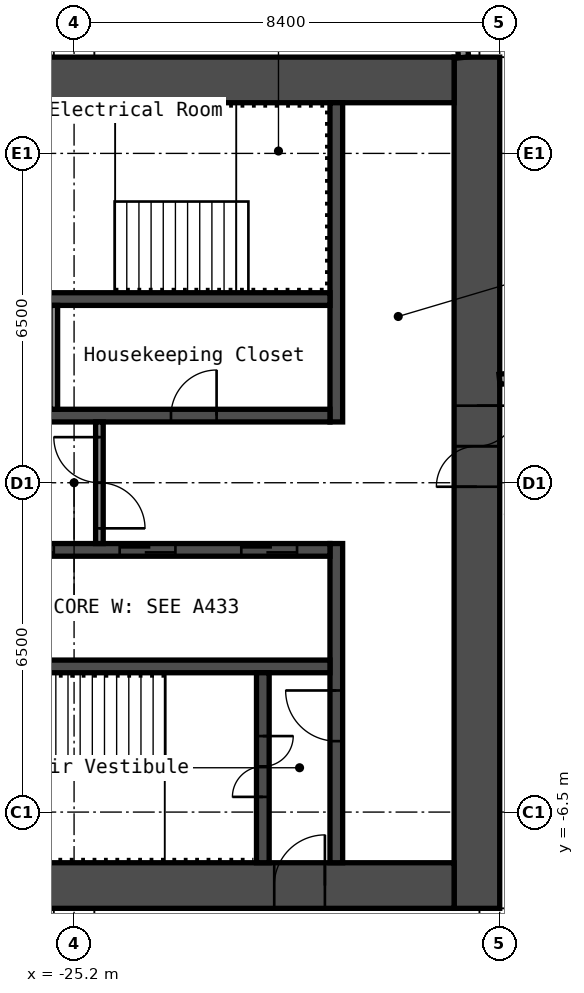
"""IFC4 building model, lengths in metres.
Left out: names, types, materials, properties, quantities, classifications, styles, units other than length and angle.
Written with IfcOpenShell. Run it as: python <this file> out.ifc"""

import sys

from ifc_helpers import new_model, si_unit, direction, frame, frame_2d, origin, place, context, subcontext, project, spatial, rectangle, extrude, element, fill, save


model = new_model("IFC4")
c1 = context("Model", 3, precision=1e-05, world=origin(), true_north=direction((0.0, 1.0)))
c2 = subcontext(c1, "Body", "Model", "MODEL_VIEW")
j1 = project(units=[si_unit("LENGTHUNIT", "METRE"), si_unit("PLANEANGLEUNIT", "RADIAN")], contexts=[c1])
p1 = place(None, origin())
s1 = spatial("IfcSite", under=j1, at=p1, CompositionType="ELEMENT")
p2 = place(p1, origin())
s2 = spatial("IfcBuilding", under=s1, at=p2, CompositionType="ELEMENT")
p3 = place(p2, frame((0.0, 0.0, 228.2)))
s3 = spatial("IfcBuildingStorey", under=s2, at=p3, CompositionType="ELEMENT", Elevation=228.2)
p4 = place(p3, frame((-17.25, -8.4, 0.0), z_axis=(0.0, 0.0, 1.0), x_axis=(0.0, 1.0, 0.0)))
e1 = element("IfcWall", 1, at=p4, inside=s3, PredefinedType="SHEAR", context=c2, shape_type="SweptSolid", body=[
    extrude(rectangle(XDim=16.8, YDim=0.9, at=frame_2d((8.4, 0.0))), origin(), (0.0, 0.0, 1.0), 4.1),
])
p5 = place(p4, frame((8.321, 0.0, 0.0)))
e2 = element("IfcOpeningElement", 2, at=p5, cuts=e1, PredefinedType="OPENING", context=c2, shape_type="SweptSolid", body=[
    extrude(rectangle(XDim=1.6, YDim=2.1, at=frame_2d((0.8, 1.05))), frame((0.0, 0.46, 0.0), z_axis=(0.0, -1.0, 0.0), x_axis=(1.0, 0.0, 0.0)), (0.0, 0.0, 1.0), 0.92),
])
p6 = place(p3, frame((-32.7, 7.95, 0.0), z_axis=(0.0, 0.0, 1.0), x_axis=(1.0, 0.0, 0.0)))
e3 = element("IfcWall", 3, at=p6, inside=s3, PredefinedType="SHEAR", context=c2, shape_type="SweptSolid", body=[
    extrude(rectangle(XDim=15.0, YDim=0.9, at=frame_2d((7.5, 0.0))), origin(), (0.0, 0.0, 1.0), 4.1),
])
p7 = place(p6, frame((3.4, 0.0, 0.0)))
e4 = element("IfcOpeningElement", 4, at=p7, cuts=e3, PredefinedType="OPENING", context=c2, shape_type="SweptSolid", body=[
    extrude(rectangle(XDim=1.2, YDim=2.1, at=frame_2d((0.6, 1.05))), frame((0.0, 0.46, 0.0), z_axis=(0.0, -1.0, 0.0), x_axis=(1.0, 0.0, 0.0)), (0.0, 0.0, 1.0), 0.92),
])
p8 = place(p6, frame((0.75, 0.0, 0.0)))
e5 = element("IfcOpeningElement", 5, at=p8, cuts=e3, PredefinedType="OPENING", context=c2, shape_type="SweptSolid", body=[
    extrude(rectangle(XDim=0.9, YDim=2.1, at=frame_2d((0.45, 1.05))), frame((0.0, 0.46, 0.0), z_axis=(0.0, -1.0, 0.0), x_axis=(1.0, 0.0, 0.0)), (0.0, 0.0, 1.0), 0.92),
])
p9 = place(p3, frame((-32.7, -7.95, 0.0), z_axis=(0.0, 0.0, 1.0), x_axis=(1.0, 0.0, 0.0)))
e6 = element("IfcWall", 6, at=p9, inside=s3, PredefinedType="SHEAR", context=c2, shape_type="SweptSolid", body=[
    extrude(rectangle(XDim=15.0, YDim=0.9, at=frame_2d((7.5, 0.0))), origin(), (0.0, 0.0, 1.0), 4.1),
])
p10 = place(p9, frame((11.45, 0.0, 0.0)))
e7 = element("IfcOpeningElement", 7, at=p10, cuts=e6, PredefinedType="OPENING", context=c2, shape_type="SweptSolid", body=[
    extrude(rectangle(XDim=1.0, YDim=2.1, at=frame_2d((0.5, 1.05))), frame((0.0, 0.46, 0.0), z_axis=(0.0, -1.0, 0.0), x_axis=(1.0, 0.0, 0.0)), (0.0, 0.0, 1.0), 0.92),
])
p11 = place(p3, frame((-20.025, 1.2, 0.0), z_axis=(0.0, 0.0, 1.0), x_axis=(0.0, 1.0, 0.0)))
e8 = element("IfcWall", 8, at=p11, inside=s3, PredefinedType="SHEAR", context=c2, shape_type="SweptSolid", body=[
    extrude(rectangle(XDim=6.3, YDim=0.25, at=frame_2d((3.15, 0.0))), origin(), (0.0, 0.0, 1.0), 4.1),
])
p12 = place(p3, frame((-20.025, -7.5, 0.0), z_axis=(0.0, 0.0, 1.0), x_axis=(0.0, 1.0, 0.0)))
e9 = element("IfcWall", 9, at=p12, inside=s3, PredefinedType="SHEAR", context=c2, shape_type="SweptSolid", body=[
    extrude(rectangle(XDim=6.3, YDim=0.25, at=frame_2d((3.15, 0.0))), origin(), (0.0, 0.0, 1.0), 4.1),
])
p13 = place(p12, frame((2.4, 0.0, 0.0)))
e10 = element("IfcOpeningElement", 10, at=p13, cuts=e9, PredefinedType="OPENING", context=c2, shape_type="SweptSolid", body=[
    extrude(rectangle(XDim=1.0, YDim=2.1, at=frame_2d((0.5, 1.05))), frame((0.0, 0.135, 0.0), z_axis=(0.0, -1.0, 0.0), x_axis=(1.0, 0.0, 0.0)), (0.0, 0.0, 1.0), 0.27),
])
p14 = place(p3, frame((-27.65, 1.325, 0.0), z_axis=(0.0, 0.0, 1.0), x_axis=(1.0, 0.0, 0.0)))
e11 = element("IfcWall", 11, at=p14, inside=s3, PredefinedType="SHEAR", context=c2, shape_type="SweptSolid", body=[
    extrude(rectangle(XDim=7.5, YDim=0.25, at=frame_2d((3.75, 0.0))), origin(), (0.0, 0.0, 1.0), 4.1),
])
p15 = place(p14, frame((4.363, 0.0, 0.0)))
e12 = element("IfcOpeningElement", 12, at=p15, cuts=e11, PredefinedType="OPENING", context=c2, shape_type="SweptSolid", body=[
    extrude(rectangle(XDim=0.9, YDim=2.1, at=frame_2d((0.45, 1.05))), frame((0.0, 0.135, 0.0), z_axis=(0.0, -1.0, 0.0), x_axis=(1.0, 0.0, 0.0)), (0.0, 0.0, 1.0), 0.27),
])
p16 = place(p14, frame((0.663, 0.0, 0.0)))
e13 = element("IfcOpeningElement", 13, at=p16, cuts=e11, PredefinedType="OPENING", context=c2, shape_type="SweptSolid", body=[
    extrude(rectangle(XDim=0.9, YDim=2.1, at=frame_2d((0.45, 1.05))), frame((0.0, 0.135, 0.0), z_axis=(0.0, -1.0, 0.0), x_axis=(1.0, 0.0, 0.0)), (0.0, 0.0, 1.0), 0.27),
])
p17 = place(p3, frame((-27.65, 3.625, 0.0), z_axis=(0.0, 0.0, 1.0), x_axis=(1.0, 0.0, 0.0)))
e14 = element("IfcWall", 14, at=p17, inside=s3, PredefinedType="SHEAR", context=c2, shape_type="SweptSolid", body=[
    extrude(rectangle(XDim=7.5, YDim=0.25, at=frame_2d((3.75, 0.0))), origin(), (0.0, 0.0, 1.0), 4.1),
])
p18 = place(p3, frame((-27.65, -1.325, 0.0), z_axis=(0.0, 0.0, 1.0), x_axis=(1.0, 0.0, 0.0)))
e15 = element("IfcWall", 15, at=p18, inside=s3, PredefinedType="SHEAR", context=c2, shape_type="SweptSolid", body=[
    extrude(rectangle(XDim=7.5, YDim=0.25, at=frame_2d((3.75, 0.0))), origin(), (0.0, 0.0, 1.0), 4.1),
])
p19 = place(p18, frame((5.75, 0.0, 0.0)))
e16 = element("IfcOpeningElement", 16, at=p19, cuts=e15, PredefinedType="OPENING", context=c2, shape_type="SweptSolid", body=[
    extrude(rectangle(XDim=1.1, YDim=2.1, at=frame_2d((0.55, 1.05))), frame((0.0, 0.135, 0.0), z_axis=(0.0, -1.0, 0.0), x_axis=(1.0, 0.0, 0.0)), (0.0, 0.0, 1.0), 0.27),
])
p20 = place(p18, frame((3.35, 0.0, 0.0)))
e17 = element("IfcOpeningElement", 17, at=p20, cuts=e15, PredefinedType="OPENING", context=c2, shape_type="SweptSolid", body=[
    extrude(rectangle(XDim=1.1, YDim=2.1, at=frame_2d((0.55, 1.05))), frame((0.0, 0.135, 0.0), z_axis=(0.0, -1.0, 0.0), x_axis=(1.0, 0.0, 0.0)), (0.0, 0.0, 1.0), 0.27),
])
p21 = place(p18, frame((0.95, 0.0, 0.0)))
e18 = element("IfcOpeningElement", 18, at=p21, cuts=e15, PredefinedType="OPENING", context=c2, shape_type="SweptSolid", body=[
    extrude(rectangle(XDim=1.1, YDim=2.1, at=frame_2d((0.55, 1.05))), frame((0.0, 0.135, 0.0), z_axis=(0.0, -1.0, 0.0), x_axis=(1.0, 0.0, 0.0)), (0.0, 0.0, 1.0), 0.27),
])
p22 = place(p3, frame((-27.65, -3.625, 0.0), z_axis=(0.0, 0.0, 1.0), x_axis=(1.0, 0.0, 0.0)))
e19 = element("IfcWall", 19, at=p22, inside=s3, PredefinedType="SHEAR", context=c2, shape_type="SweptSolid", body=[
    extrude(rectangle(XDim=7.5, YDim=0.25, at=frame_2d((3.75, 0.0))), origin(), (0.0, 0.0, 1.0), 4.1),
])
p23 = place(p3, frame((-21.475, -7.5, 0.0), z_axis=(0.0, 0.0, 1.0), x_axis=(0.0, 1.0, 0.0)))
e20 = element("IfcWall", 20, at=p23, inside=s3, PredefinedType="SHEAR", context=c2, shape_type="SweptSolid", body=[
    extrude(rectangle(XDim=3.75, YDim=0.25, at=frame_2d((1.875, 0.0))), origin(), (0.0, 0.0, 1.0), 4.1),
])
p24 = place(p23, frame((1.3, 0.0, 0.0)))
e21 = element("IfcOpeningElement", 21, at=p24, cuts=e20, PredefinedType="OPENING", context=c2, shape_type="SweptSolid", body=[
    extrude(rectangle(XDim=1.2, YDim=2.1, at=frame_2d((0.6, 1.05))), frame((0.0, 0.135, 0.0), z_axis=(0.0, -1.0, 0.0), x_axis=(1.0, 0.0, 0.0)), (0.0, 0.0, 1.0), 0.27),
])
p25 = place(p3, frame((-24.7, -1.2, 0.0), z_axis=(0.0, 0.0, 1.0), x_axis=(0.0, 1.0, 0.0)))
e22 = element("IfcWall", 22, at=p25, inside=s3, PredefinedType="PARTITIONING", context=c2, shape_type="SweptSolid", body=[
    extrude(rectangle(XDim=2.4, YDim=0.15, at=frame_2d((1.2, 0.0))), origin(), (0.0, 0.0, 1.0), 4.1),
])
p26 = place(p25, frame((0.3, 0.0, 0.0)))
e23 = element("IfcOpeningElement", 23, at=p26, cuts=e22, PredefinedType="OPENING", context=c2, shape_type="SweptSolid", body=[
    extrude(rectangle(XDim=1.8, YDim=2.1, at=frame_2d((0.9, 1.05))), frame((0.0, 0.085, 0.0), z_axis=(0.0, -1.0, 0.0), x_axis=(1.0, 0.0, 0.0)), (0.0, 0.0, 1.0), 0.17),
])
p27 = place(p3, frame((-25.6, 1.45, 0.0), z_axis=(0.0, 0.0, 1.0), x_axis=(0.0, 1.0, 0.0)))
e24 = element("IfcWall", 24, at=p27, inside=s3, PredefinedType="PARTITIONING", context=c2, shape_type="SweptSolid", body=[
    extrude(rectangle(XDim=2.05, YDim=0.15, at=frame_2d((1.025, 0.0))), origin(), (0.0, 0.0, 1.0), 4.1),
])
p28 = place(p3, frame((-16.805, 2.041, 0.0), z_axis=(0.0, 0.0, 1.0), x_axis=(0.994521146831, 0.104535584879, 0.0)))
e25 = element("IfcWall", 25, at=p28, inside=s3, PredefinedType="PARTITIONING", context=c2, shape_type="SweptSolid", body=[
    extrude(rectangle(XDim=33.561, YDim=0.2, at=frame_2d((16.78, 0.0))), origin(), (0.0, 0.0, 1.0), 4.1),
])
p29 = place(p28, frame((3.711, 0.0, 0.0)))
e26 = element("IfcOpeningElement", 26, at=p29, cuts=e25, PredefinedType="OPENING", context=c2, shape_type="SweptSolid", body=[
    extrude(rectangle(XDim=0.9, YDim=2.1, at=frame_2d((0.45, 1.05))), frame((0.0, 0.11, 0.0), z_axis=(0.0, -1.0, 0.0), x_axis=(1.0, 0.0, 0.0)), (0.0, 0.0, 1.0), 0.22),
])
p30 = place(p28, frame((12.111, 0.0, 0.0)))
e27 = element("IfcOpeningElement", 27, at=p30, cuts=e25, PredefinedType="OPENING", context=c2, shape_type="SweptSolid", body=[
    extrude(rectangle(XDim=0.9, YDim=2.1, at=frame_2d((0.45, 1.05))), frame((0.0, 0.11, 0.0), z_axis=(0.0, -1.0, 0.0), x_axis=(1.0, 0.0, 0.0)), (0.0, 0.0, 1.0), 0.22),
])
p31 = place(p28, frame((20.161, 0.0, 0.0)))
e28 = element("IfcOpeningElement", 28, at=p31, cuts=e25, PredefinedType="OPENING", context=c2, shape_type="SweptSolid", body=[
    extrude(rectangle(XDim=1.6, YDim=2.1, at=frame_2d((0.8, 1.05))), frame((0.0, 0.11, 0.0), z_axis=(0.0, -1.0, 0.0), x_axis=(1.0, 0.0, 0.0)), (0.0, 0.0, 1.0), 0.22),
])
p32 = place(p28, frame((28.561, 0.0, 0.0)))
e29 = element("IfcOpeningElement", 29, at=p32, cuts=e25, PredefinedType="OPENING", context=c2, shape_type="SweptSolid", body=[
    extrude(rectangle(XDim=1.6, YDim=2.1, at=frame_2d((0.8, 1.05))), frame((0.0, 0.11, 0.0), z_axis=(0.0, -1.0, 0.0), x_axis=(1.0, 0.0, 0.0)), (0.0, 0.0, 1.0), 0.22),
])
p33 = place(p3, frame((-17.512, 8.395, 0.0), z_axis=(0.0, 0.0, 1.0), x_axis=(-0.104527492615, 0.994521997387, 0.0)))
e30 = element("IfcWall", 30, at=p33, inside=s3, PredefinedType="PARTITIONING", context=c2, shape_type="SweptSolid", body=[
    extrude(rectangle(XDim=13.897, YDim=0.2, at=frame_2d((6.949, 0.0))), origin(), (0.0, 0.0, 1.0), 4.1),
])
p34 = place(p5, origin())
e31 = element("IfcDoor", 31, at=p34, inside=s3, OperationType="DOUBLE_DOOR_SINGLE_SWING", PredefinedType="DOOR", context=c2, shape_type="SweptSolid", body=[
    extrude(rectangle(XDim=1.6, YDim=2.1, at=frame_2d((0.8, 1.05))), frame((0.0, 0.025, 0.0), z_axis=(0.0, -1.0, 0.0), x_axis=(1.0, 0.0, 0.0)), (0.0, 0.0, 1.0), 0.05),
])
fill(e2, e31)
p35 = place(p10, origin())
e32 = element("IfcDoor", 32, at=p35, inside=s3, OperationType="SINGLE_SWING_LEFT", PredefinedType="DOOR", context=c2, shape_type="SweptSolid", body=[
    extrude(rectangle(XDim=1.0, YDim=2.1, at=frame_2d((0.5, 1.05))), frame((0.0, 0.025, 0.0), z_axis=(0.0, -1.0, 0.0), x_axis=(1.0, 0.0, 0.0)), (0.0, 0.0, 1.0), 0.05),
])
fill(e7, e32)
p36 = place(p24, origin())
e33 = element("IfcDoor", 33, at=p36, inside=s3, OperationType="DOUBLE_DOOR_SINGLE_SWING", PredefinedType="DOOR", context=c2, shape_type="SweptSolid", body=[
    extrude(rectangle(XDim=1.2, YDim=2.1, at=frame_2d((0.6, 1.05))), frame((0.0, 0.025, 0.0), z_axis=(0.0, -1.0, 0.0), x_axis=(1.0, 0.0, 0.0)), (0.0, 0.0, 1.0), 0.05),
])
fill(e21, e33)
p37 = place(p13, origin())
e34 = element("IfcDoor", 34, at=p37, inside=s3, OperationType="SINGLE_SWING_LEFT", PredefinedType="DOOR", context=c2, shape_type="SweptSolid", body=[
    extrude(rectangle(XDim=1.0, YDim=2.1, at=frame_2d((0.5, 1.05))), frame((0.0, 0.025, 0.0), z_axis=(0.0, -1.0, 0.0), x_axis=(1.0, 0.0, 0.0)), (0.0, 0.0, 1.0), 0.05),
])
fill(e10, e34)
p38 = place(p26, origin())
e35 = element("IfcDoor", 35, at=p38, inside=s3, OperationType="DOUBLE_DOOR_SINGLE_SWING", PredefinedType="DOOR", context=c2, shape_type="SweptSolid", body=[
    extrude(rectangle(XDim=1.8, YDim=2.1, at=frame_2d((0.9, 1.05))), frame((0.0, 0.025, 0.0), z_axis=(0.0, -1.0, 0.0), x_axis=(1.0, 0.0, 0.0)), (0.0, 0.0, 1.0), 0.05),
])
fill(e23, e35)
p39 = place(p15, origin())
e36 = element("IfcDoor", 36, at=p39, inside=s3, OperationType="SINGLE_SWING_LEFT", PredefinedType="DOOR", context=c2, shape_type="SweptSolid", body=[
    extrude(rectangle(XDim=0.9, YDim=2.1, at=frame_2d((0.45, 1.05))), frame((0.0, 0.025, 0.0), z_axis=(0.0, -1.0, 0.0), x_axis=(1.0, 0.0, 0.0)), (0.0, 0.0, 1.0), 0.05),
])
fill(e12, e36)
p40 = place(p19, origin())
e37 = element("IfcDoor", 37, at=p40, inside=s3, OperationType="DOUBLE_DOOR_SLIDING", PredefinedType="DOOR", context=c2, shape_type="SweptSolid", body=[
    extrude(rectangle(XDim=1.1, YDim=2.1, at=frame_2d((0.55, 1.05))), frame((0.0, 0.025, 0.0), z_axis=(0.0, -1.0, 0.0), x_axis=(1.0, 0.0, 0.0)), (0.0, 0.0, 1.0), 0.05),
])
fill(e16, e37)
p41 = place(p20, origin())
e38 = element("IfcDoor", 38, at=p41, inside=s3, OperationType="DOUBLE_DOOR_SLIDING", PredefinedType="DOOR", context=c2, shape_type="SweptSolid", body=[
    extrude(rectangle(XDim=1.1, YDim=2.1, at=frame_2d((0.55, 1.05))), frame((0.0, 0.025, 0.0), z_axis=(0.0, -1.0, 0.0), x_axis=(1.0, 0.0, 0.0)), (0.0, 0.0, 1.0), 0.05),
])
fill(e17, e38)
p42 = place(p21, origin())
e39 = element("IfcDoor", 39, at=p42, inside=s3, OperationType="DOUBLE_DOOR_SLIDING", PredefinedType="DOOR", context=c2, shape_type="SweptSolid", body=[
    extrude(rectangle(XDim=1.1, YDim=2.1, at=frame_2d((0.55, 1.05))), frame((0.0, 0.025, 0.0), z_axis=(0.0, -1.0, 0.0), x_axis=(1.0, 0.0, 0.0)), (0.0, 0.0, 1.0), 0.05),
])
fill(e18, e39)
save(model, sys.argv[1])
